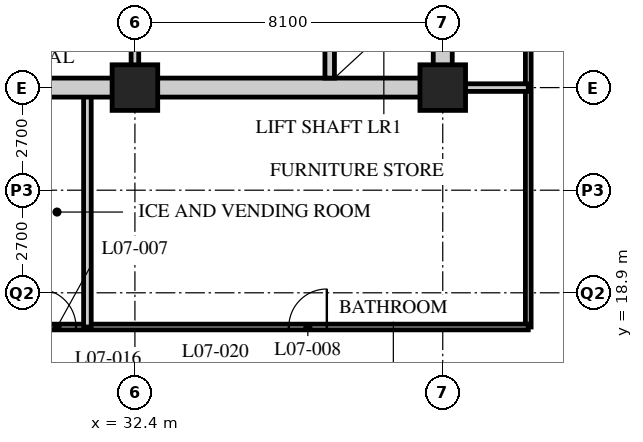
"""IFC4 building model, lengths in metres.
Left out: names, types, materials, properties, quantities, classifications, styles, units other than length and angle.
Written with IfcOpenShell. Run it as: python <this file> out.ifc"""

import sys

from ifc_helpers import new_model, si_unit, direction, frame, frame_2d, origin, origin_2d, place, context, subcontext, project, spatial, rectangle, hollow_rectangle, extrude, element, fill, save


model = new_model("IFC4")
c1 = context("Model", 3, precision=1e-05, world=origin(), true_north=direction((0.0, 1.0)))
c2 = subcontext(c1, "Body", "Model", "MODEL_VIEW")
j1 = project(units=[si_unit("LENGTHUNIT", "METRE"), si_unit("PLANEANGLEUNIT", "RADIAN")], contexts=[c1])
p1 = place(None, origin())
s1 = spatial("IfcSite", under=j1, at=p1, CompositionType="ELEMENT")
p2 = place(p1, origin())
s2 = spatial("IfcBuilding", under=s1, at=p2, CompositionType="ELEMENT")
p3 = place(p2, frame((0.0, 0.0, 36.4)))
s3 = spatial("IfcBuildingStorey", under=s2, at=p3, CompositionType="ELEMENT", Elevation=36.4)
for number, where, z_axis, x_axis in (
    (1, (32.4, 24.3, 0.0), (0.0, 0.0, 1.0), (1.0, 0.0, 0.0)),
    (2, (40.5, 24.3, 0.0), (0.0, 0.0, 1.0), (1.0, 0.0, 0.0)),
):
    element("IfcColumn", number, at=place(p3, frame(where, z_axis=z_axis, x_axis=x_axis)), inside=s3, PredefinedType="COLUMN", context=c2, shape_type="SweptSolid", body=[
        extrude(hollow_rectangle(XDim=1.2, YDim=1.2, WallThickness=0.12, at=origin_2d()), origin(), (0.0, 0.0, 1.0), 3.4),
    ])
p4 = place(p3, frame((42.75, 18.0, 0.0), z_axis=(0.0, 0.0, 1.0), x_axis=(0.0, 1.0, 0.0)))
e3 = element("IfcWall", 3, at=p4, inside=s3, PredefinedType="PARTITIONING", context=c2, shape_type="SweptSolid", body=[
    extrude(rectangle(XDim=22.5, YDim=0.15, at=frame_2d((11.25, 0.0))), origin(), (0.0, 0.0, 1.0), 3.19),
])
p5 = place(p4, frame((9.85, 0.0, 0.0)))
e4 = element("IfcOpeningElement", 4, at=p5, cuts=e3, PredefinedType="OPENING", context=c2, shape_type="SweptSolid", body=[
    extrude(rectangle(XDim=1.0, YDim=2.1, at=frame_2d((0.5, 1.05))), frame((0.0, 0.085, 0.0), z_axis=(0.0, -1.0, 0.0), x_axis=(1.0, 0.0, 0.0)), (0.0, 0.0, 1.0), 0.17),
])
p6 = place(p4, frame((17.95, 0.0, 0.0)))
e5 = element("IfcOpeningElement", 5, at=p6, cuts=e3, PredefinedType="OPENING", context=c2, shape_type="SweptSolid", body=[
    extrude(rectangle(XDim=1.0, YDim=2.1, at=frame_2d((0.5, 1.05))), frame((0.0, 0.085, 0.0), z_axis=(0.0, -1.0, 0.0), x_axis=(1.0, 0.0, 0.0)), (0.0, 0.0, 1.0), 0.17),
])
p7 = place(p3, frame((29.56, 18.0, 0.0), z_axis=(0.0, 0.0, 1.0), x_axis=(1.0, 0.0, 0.0)))
e6 = element("IfcWall", 6, at=p7, inside=s3, PredefinedType="PARTITIONING", context=c2, shape_type="SweptSolid", body=[
    extrude(rectangle(XDim=13.19, YDim=0.15, at=frame_2d((6.595, 0.0))), origin(), (0.0, 0.0, 1.0), 3.19),
])
p8 = place(p7, frame((0.29, 0.0, 0.0)))
e7 = element("IfcOpeningElement", 7, at=p8, cuts=e6, PredefinedType="OPENING", context=c2, shape_type="SweptSolid", body=[
    extrude(rectangle(XDim=1.0, YDim=2.1, at=frame_2d((0.5, 1.05))), frame((0.0, 0.085, 0.0), z_axis=(0.0, -1.0, 0.0), x_axis=(1.0, 0.0, 0.0)), (0.0, 0.0, 1.0), 0.17),
])
p9 = place(p7, frame((6.89, 0.0, 0.0)))
e8 = element("IfcOpeningElement", 8, at=p9, cuts=e6, PredefinedType="OPENING", context=c2, shape_type="SweptSolid", body=[
    extrude(rectangle(XDim=1.0, YDim=2.1, at=frame_2d((0.5, 1.05))), frame((0.0, 0.085, 0.0), z_axis=(0.0, -1.0, 0.0), x_axis=(1.0, 0.0, 0.0)), (0.0, 0.0, 1.0), 0.17),
])
p10 = place(p3, frame((31.15, 18.0, 0.0), z_axis=(0.0, 0.0, 1.0), x_axis=(0.0, 1.0, 0.0)))
e9 = element("IfcWall", 9, at=p10, inside=s3, PredefinedType="SOLIDWALL", context=c2, shape_type="SweptSolid", body=[
    extrude(rectangle(XDim=6.3, YDim=0.2, at=frame_2d((3.15, 0.0))), origin(), (0.0, 0.0, 1.0), 3.19),
])
p11 = place(p3, frame((40.5, 24.3, 0.0), z_axis=(0.0, 0.0, 1.0), x_axis=(1.0, 0.0, 0.0)))
e10 = element("IfcWall", 10, at=p11, inside=s3, PredefinedType="SOLIDWALL", context=c2, shape_type="SweptSolid", body=[
    extrude(rectangle(XDim=2.25, YDim=0.2, at=frame_2d((1.125, 0.0))), origin(), (0.0, 0.0, 1.0), 2.578),
])
p12 = place(p3, frame((15.95, 24.3, 0.0), z_axis=(0.0, 0.0, 1.0), x_axis=(1.0, 0.0, 0.0)))
e11 = element("IfcWall", 11, at=p12, inside=s3, PredefinedType="SOLIDWALL", context=c2, shape_type="SweptSolid", body=[
    extrude(rectangle(XDim=24.8, YDim=0.5, at=frame_2d((12.4, 0.0))), origin(), (0.0, 0.0, 1.0), 2.54),
])
p13 = place(p12, frame((11.5, 0.0, 0.0)))
e12 = element("IfcOpeningElement", 12, at=p13, cuts=e11, PredefinedType="OPENING", context=c2, shape_type="SweptSolid", body=[
    extrude(rectangle(XDim=1.8, YDim=2.4, at=frame_2d((0.9, 1.2))), frame((0.0, 0.26, 0.0), z_axis=(0.0, -1.0, 0.0), x_axis=(1.0, 0.0, 0.0)), (0.0, 0.0, 1.0), 0.52),
])
p14 = place(p3, frame((40.5, 24.55, 0.0), z_axis=(0.0, 0.0, 1.0), x_axis=(0.0, 1.0, 0.0)))
e13 = element("IfcWall", 13, at=p14, inside=s3, PredefinedType="SOLIDWALL", context=c2, shape_type="SweptSolid", body=[
    extrude(rectangle(XDim=15.7, YDim=0.5, at=frame_2d((7.85, 0.0))), origin(), (0.0, 0.0, 1.0), 2.578),
])
p15 = place(p3, frame((37.525, 24.55, 0.0), z_axis=(0.0, 0.0, 1.0), x_axis=(0.0, 1.0, 0.0)))
e14 = element("IfcWall", 14, at=p15, inside=s3, PredefinedType="SOLIDWALL", context=c2, shape_type="SweptSolid", body=[
    extrude(rectangle(XDim=7.75, YDim=0.25, at=frame_2d((3.875, 0.0))), origin(), (0.0, 0.0, 1.0), 3.19),
])
p16 = place(p3, frame((32.4, 24.55, 0.0), z_axis=(0.0, 0.0, 1.0), x_axis=(0.0, 1.0, 0.0)))
e15 = element("IfcWall", 15, at=p16, inside=s3, PredefinedType="PARTITIONING", context=c2, shape_type="SweptSolid", body=[
    extrude(rectangle(XDim=7.75, YDim=0.2, at=frame_2d((3.875, 0.0))), origin(), (0.0, 0.0, 1.0), 2.578),
])
p17 = place(p16, frame((0.925, 0.0, 0.0)))
e16 = element("IfcOpeningElement", 16, at=p17, cuts=e15, PredefinedType="OPENING", context=c2, shape_type="SweptSolid", body=[
    extrude(rectangle(XDim=0.9, YDim=2.1, at=frame_2d((0.45, 1.05))), frame((0.0, 0.11, 0.0), z_axis=(0.0, -1.0, 0.0), x_axis=(1.0, 0.0, 0.0)), (0.0, 0.0, 1.0), 0.22),
])
p18 = place(p16, frame((3.275, 0.0, 0.0)))
e17 = element("IfcOpeningElement", 17, at=p18, cuts=e15, PredefinedType="OPENING", context=c2, shape_type="SweptSolid", body=[
    extrude(rectangle(XDim=1.0, YDim=2.1, at=frame_2d((0.5, 1.05))), frame((0.0, 0.11, 0.0), z_axis=(0.0, -1.0, 0.0), x_axis=(1.0, 0.0, 0.0)), (0.0, 0.0, 1.0), 0.22),
])
p19 = place(p16, frame((5.775, 0.0, 0.0)))
e18 = element("IfcOpeningElement", 18, at=p19, cuts=e15, PredefinedType="OPENING", context=c2, shape_type="SweptSolid", body=[
    extrude(rectangle(XDim=1.0, YDim=2.1, at=frame_2d((0.5, 1.05))), frame((0.0, 0.11, 0.0), z_axis=(0.0, -1.0, 0.0), x_axis=(1.0, 0.0, 0.0)), (0.0, 0.0, 1.0), 0.22),
])
p20 = place(p8, origin())
e19 = element("IfcDoor", 19, at=p20, inside=s3, OperationType="SINGLE_SWING_LEFT", PredefinedType="DOOR", context=c2, shape_type="SweptSolid", body=[
    extrude(rectangle(XDim=1.0, YDim=2.1, at=frame_2d((0.5, 1.05))), frame((0.0, 0.025, 0.0), z_axis=(0.0, -1.0, 0.0), x_axis=(1.0, 0.0, 0.0)), (0.0, 0.0, 1.0), 0.05),
])
fill(e7, e19)
p21 = place(p9, origin())
e20 = element("IfcDoor", 20, at=p21, inside=s3, OperationType="SINGLE_SWING_RIGHT", PredefinedType="DOOR", context=c2, shape_type="SweptSolid", body=[
    extrude(rectangle(XDim=1.0, YDim=2.1, at=frame_2d((0.5, 1.05))), frame((0.0, 0.025, 0.0), z_axis=(0.0, -1.0, 0.0), x_axis=(1.0, 0.0, 0.0)), (0.0, 0.0, 1.0), 0.05),
])
fill(e8, e20)
save(model, sys.argv[1])
